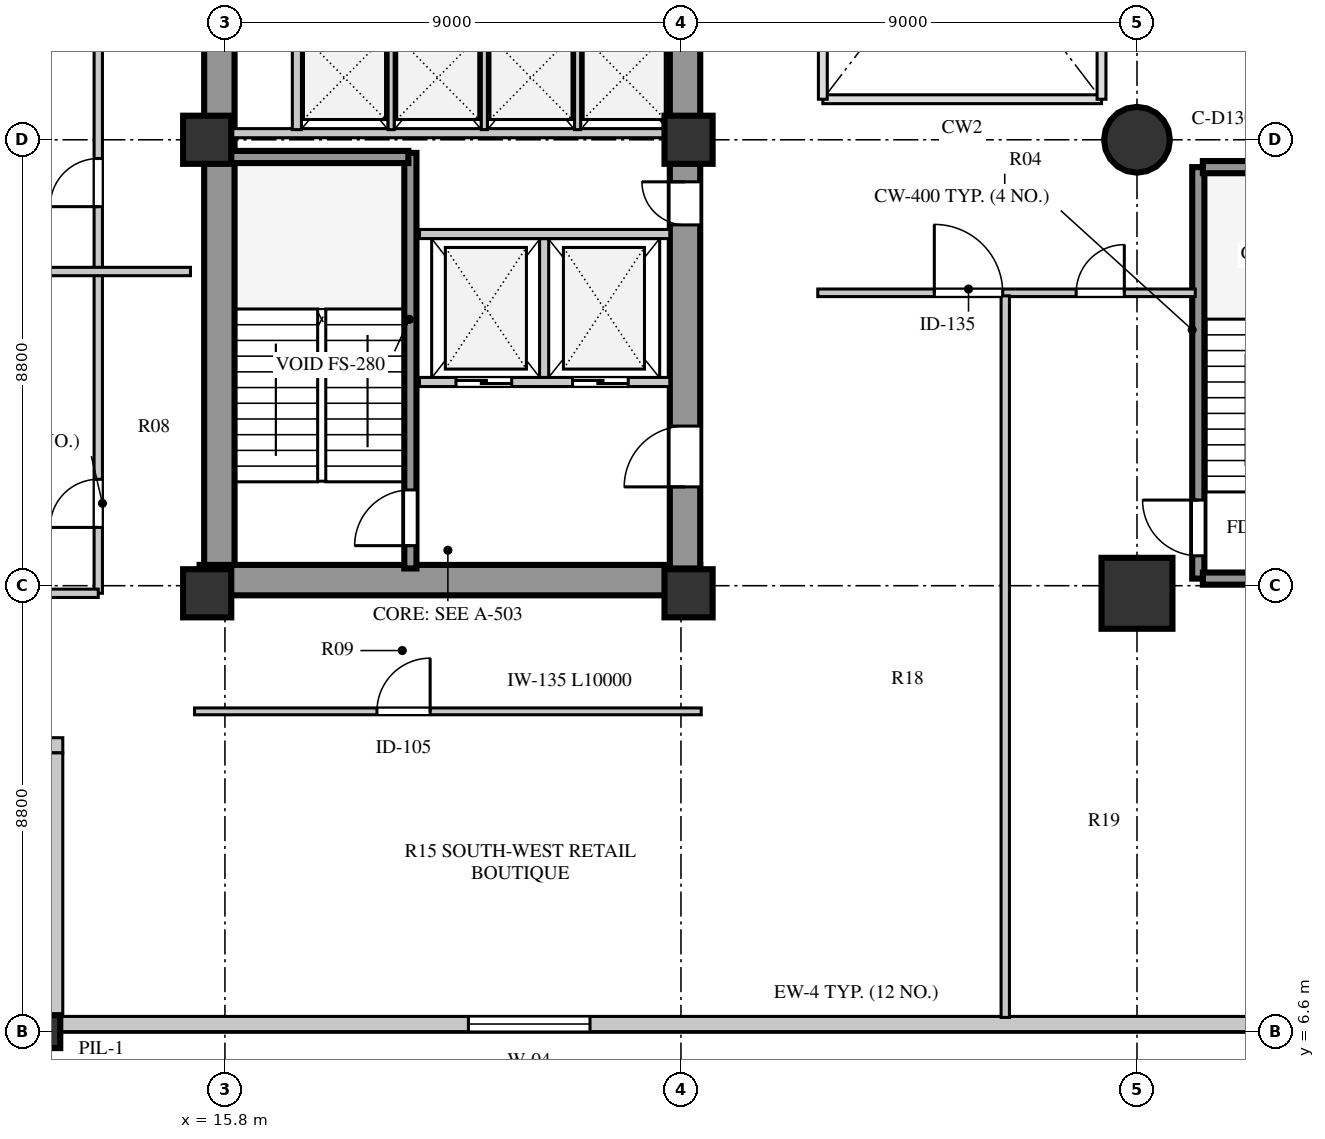
"""IFC4 building model, lengths in metres.
Left out: names, types, materials, properties, quantities, classifications, styles, units other than length and angle.
Written with IfcOpenShell. Run it as: python <this file> out.ifc"""

import sys

from ifc_helpers import new_model, si_unit, direction, frame, frame_2d, origin, origin_2d, place, context, subcontext, project, spatial, rectangle, circle, extrude, element, fill, save


model = new_model("IFC4")
c1 = context("Model", 3, precision=1e-05, world=origin(), true_north=direction((0.0, 1.0)))
c2 = subcontext(c1, "Body", "Model", "MODEL_VIEW")
j1 = project(units=[si_unit("LENGTHUNIT", "METRE"), si_unit("PLANEANGLEUNIT", "RADIAN")], contexts=[c1])
p1 = place(None, origin())
s1 = spatial("IfcSite", under=j1, at=p1, CompositionType="ELEMENT")
p2 = place(p1, origin())
s2 = spatial("IfcBuilding", under=s1, at=p2, CompositionType="ELEMENT")
p3 = place(p2, frame((0.0, 0.0, 17.0)))
s3 = spatial("IfcBuildingStorey", under=s2, at=p3, CompositionType="ELEMENT", Elevation=17.0)
p4 = place(p3, frame((15.3, 15.51, 0.0), z_axis=(0.0, 0.0, 1.0), x_axis=(1.0, 0.0, 0.0)))
e1 = element("IfcWall", 1, at=p4, inside=s3, PredefinedType="SHEAR", context=c2, shape_type="SweptSolid", body=[
    extrude(rectangle(XDim=9.88, YDim=0.6, at=frame_2d((4.94, 0.0))), origin(), (0.0, 0.0, 1.0), 4.22),
])
p5 = place(p3, frame((15.69, 15.81, 0.0), z_axis=(0.0, 0.0, 1.0), x_axis=(0.0, 1.0, 0.0)))
e2 = element("IfcWall", 2, at=p5, inside=s3, PredefinedType="SHEAR", context=c2, shape_type="SweptSolid", body=[
    extrude(rectangle(XDim=25.63, YDim=0.6, at=frame_2d((12.815, 0.0))), origin(), (0.0, 0.0, 1.0), 4.22),
])
p6 = place(p3, frame((24.88, 15.74, 0.0), z_axis=(0.0, 0.0, 1.0), x_axis=(0.0, 1.0, 0.0)))
e3 = element("IfcWall", 3, at=p6, inside=s3, PredefinedType="SHEAR", context=c2, shape_type="SweptSolid", body=[
    extrude(rectangle(XDim=25.76, YDim=0.6, at=frame_2d((12.88, 0.0))), origin(), (0.0, 0.0, 1.0), 4.22),
])
p7 = place(p6, frame((1.61, 0.0, 0.0)))
e4 = element("IfcOpeningElement", 4, at=p7, cuts=e3, PredefinedType="OPENING", context=c2, shape_type="SweptSolid", body=[
    extrude(rectangle(XDim=1.2, YDim=2.1, at=frame_2d((0.6, 1.05))), frame((0.0, 0.31, 0.0), z_axis=(0.0, -1.0, 0.0), x_axis=(1.0, 0.0, 0.0)), (0.0, 0.0, 1.0), 0.62),
])
p8 = place(p6, frame((6.78, 0.0, 0.0)))
e5 = element("IfcOpeningElement", 5, at=p8, cuts=e3, PredefinedType="OPENING", context=c2, shape_type="SweptSolid", body=[
    extrude(rectangle(XDim=0.85, YDim=2.06, at=frame_2d((0.425, 1.03))), frame((0.0, 0.31, 0.0), z_axis=(0.0, -1.0, 0.0), x_axis=(1.0, 0.0, 0.0)), (0.0, 0.0, 1.0), 0.62),
])
p9 = place(p6, frame((12.11, 0.0, 0.0)))
e6 = element("IfcOpeningElement", 6, at=p9, cuts=e3, PredefinedType="OPENING", context=c2, shape_type="SweptSolid", body=[
    extrude(rectangle(XDim=1.5, YDim=2.12, at=frame_2d((0.75, 1.06))), frame((0.0, 0.31, 0.0), z_axis=(0.0, -1.0, 0.0), x_axis=(1.0, 0.0, 0.0)), (0.0, 0.0, 1.0), 0.62),
])
p10 = place(p6, frame((20.11, 0.0, 0.0)))
e7 = element("IfcOpeningElement", 7, at=p10, cuts=e3, PredefinedType="OPENING", context=c2, shape_type="SweptSolid", body=[
    extrude(rectangle(XDim=1.2, YDim=2.12, at=frame_2d((0.6, 1.06))), frame((0.0, 0.31, 0.0), z_axis=(0.0, -1.0, 0.0), x_axis=(1.0, 0.0, 0.0)), (0.0, 0.0, 1.0), 0.62),
])
p11 = place(p6, frame((24.01, 0.0, 0.0)))
e8 = element("IfcOpeningElement", 8, at=p11, cuts=e3, PredefinedType="OPENING", context=c2, shape_type="SweptSolid", body=[
    extrude(rectangle(XDim=0.95, YDim=2.1, at=frame_2d((0.475, 1.05))), frame((0.0, 0.31, 0.0), z_axis=(0.0, -1.0, 0.0), x_axis=(1.0, 0.0, 0.0)), (0.0, 0.0, 1.0), 0.62),
])
for number, where, z_axis, x_axis in (
    (9, (15.45, 15.25, 0.0), (0.0, 0.0, 1.0), (1.0, 0.0, 0.0)),
    (10, (15.45, 24.2, 0.0), (0.0, 0.0, 1.0), (1.0, 0.0, 0.0)),
    (11, (24.95, 15.25, 0.0), (0.0, 0.0, 1.0), (1.0, 0.0, 0.0)),
    (12, (24.95, 24.2, 0.0), (0.0, 0.0, 1.0), (1.0, 0.0, 0.0)),
):
    element("IfcColumn", number, at=place(p3, frame(where, z_axis=z_axis, x_axis=x_axis)), inside=s3, PredefinedType="COLUMN", context=c2, shape_type="SweptSolid", body=[
        extrude(rectangle(XDim=0.95, YDim=0.95, at=origin_2d()), origin(), (0.0, 0.0, 1.0), 4.22),
    ])
p12 = place(p3, frame((33.8, 15.25, 0.0), z_axis=(0.0, 0.0, 1.0), x_axis=(1.0, 0.0, 0.0)))
e13 = element("IfcColumn", 13, at=p12, inside=s3, PredefinedType="COLUMN", context=c2, shape_type="SweptSolid", body=[
    extrude(rectangle(XDim=1.4, YDim=1.4, at=origin_2d()), origin(), (0.0, 0.0, 1.0), 4.22),
])
p13 = place(p3, frame((33.8, 24.2, 0.0), z_axis=(0.0, 0.0, 1.0), x_axis=(1.0, 0.0, 0.0)))
e14 = element("IfcColumn", 14, at=p13, inside=s3, PredefinedType="COLUMN", context=c2, shape_type="SweptSolid", body=[
    extrude(circle(Radius=0.65, at=origin_2d()), origin(), (0.0, 0.0, 1.0), 4.22),
])
p14 = place(p3, frame((12.3, 6.6, 0.0), z_axis=(0.0, 0.0, 1.0), x_axis=(1.0, 0.0, 0.0)))
e15 = element("IfcColumn", 15, at=p14, inside=s3, PredefinedType="PILASTER", context=c2, shape_type="SweptSolid", body=[
    extrude(rectangle(XDim=0.5, YDim=0.65, at=origin_2d()), origin(), (0.0, 0.0, 1.0), 4.22),
])
p15 = place(p3, frame((12.3, 6.75, 0.0), z_axis=(0.0, 0.0, 1.0), x_axis=(1.0, 0.0, 0.0)))
e16 = element("IfcWall", 16, at=p15, inside=s3, PredefinedType="STANDARD", context=c2, shape_type="SweptSolid", body=[
    extrude(rectangle(XDim=34.0, YDim=0.3, at=frame_2d((17.0, 0.0))), origin(), (0.0, 0.0, 1.0), 4.22),
])
p16 = place(p15, frame((8.305, 0.0, 0.8)))
e17 = element("IfcOpeningElement", 17, at=p16, cuts=e16, PredefinedType="OPENING", context=c2, shape_type="SweptSolid", body=[
    extrude(rectangle(XDim=2.4, YDim=2.05, at=frame_2d((1.2, 1.025))), frame((0.0, 0.16, 0.0), z_axis=(0.0, -1.0, 0.0), x_axis=(1.0, 0.0, 0.0)), (0.0, 0.0, 1.0), 0.32),
])
p17 = place(p15, frame((25.345, 0.0, 0.8)))
e18 = element("IfcOpeningElement", 18, at=p17, cuts=e16, PredefinedType="OPENING", context=c2, shape_type="SweptSolid", body=[
    extrude(rectangle(XDim=2.1, YDim=1.95, at=frame_2d((1.05, 0.975))), frame((0.0, 0.16, 0.0), z_axis=(0.0, -1.0, 0.0), x_axis=(1.0, 0.0, 0.0)), (0.0, 0.0, 1.0), 0.32),
])
p18 = place(p3, frame((6.8, 12.25, 0.0), z_axis=(0.0, 0.0, 1.0), x_axis=(1.0, 0.0, 0.0)))
e19 = element("IfcWall", 19, at=p18, inside=s3, PredefinedType="STANDARD", context=c2, shape_type="SweptSolid", body=[
    extrude(rectangle(XDim=5.8, YDim=0.3, at=frame_2d((2.9, 0.0))), origin(), (0.0, 0.0, 1.0), 4.22),
])
p19 = place(p3, frame((12.45, 12.1, 0.0), z_axis=(0.0, 0.0, 1.0), x_axis=(0.0, -1.0, 0.0)))
e20 = element("IfcWall", 20, at=p19, inside=s3, PredefinedType="STANDARD", context=c2, shape_type="SweptSolid", body=[
    extrude(rectangle(XDim=5.2, YDim=0.3, at=frame_2d((2.6, 0.0))), origin(), (0.0, 0.0, 1.0), 4.22),
])
p20 = place(p3, frame((19.46, 15.74, 0.0), z_axis=(0.0, 0.0, 1.0), x_axis=(0.0, 1.0, 0.0)))
e21 = element("IfcWall", 21, at=p20, inside=s3, PredefinedType="SHEAR", context=c2, shape_type="SweptSolid", body=[
    extrude(rectangle(XDim=8.2, YDim=0.24, at=frame_2d((4.1, 0.0))), origin(), (0.0, 0.0, 1.0), 4.5),
])
p21 = place(p20, frame((0.45, 0.0, 0.0)))
e22 = element("IfcOpeningElement", 22, at=p21, cuts=e21, PredefinedType="OPENING", context=c2, shape_type="SweptSolid", body=[
    extrude(rectangle(XDim=1.1, YDim=2.1, at=frame_2d((0.55, 1.05))), frame((0.0, 0.13, 0.0), z_axis=(0.0, -1.0, 0.0), x_axis=(1.0, 0.0, 0.0)), (0.0, 0.0, 1.0), 0.26),
])
p22 = place(p3, frame((15.9, 23.86, 0.0), z_axis=(0.0, 0.0, 1.0), x_axis=(1.0, 0.0, 0.0)))
e23 = element("IfcWall", 23, at=p22, inside=s3, PredefinedType="SHEAR", context=c2, shape_type="SweptSolid", body=[
    extrude(rectangle(XDim=3.52, YDim=0.24, at=frame_2d((1.76, 0.0))), origin(), (0.0, 0.0, 1.0), 4.5),
])
p23 = place(p3, frame((19.64, 19.42, 0.0), z_axis=(0.0, 0.0, 1.0), x_axis=(1.0, 0.0, 0.0)))
e24 = element("IfcWall", 24, at=p23, inside=s3, PredefinedType="SOLIDWALL", context=c2, shape_type="SweptSolid", body=[
    extrude(rectangle(XDim=4.94, YDim=0.18, at=frame_2d((2.47, 0.0))), origin(), (0.0, 0.0, 1.0), 4.22),
])
p24 = place(p23, frame((0.72, 0.0, 0.0)))
e25 = element("IfcOpeningElement", 25, at=p24, cuts=e24, PredefinedType="OPENING", context=c2, shape_type="SweptSolid", body=[
    extrude(rectangle(XDim=1.1, YDim=2.1, at=frame_2d((0.55, 1.05))), frame((0.0, 0.1, 0.0), z_axis=(0.0, -1.0, 0.0), x_axis=(1.0, 0.0, 0.0)), (0.0, 0.0, 1.0), 0.2),
])
p25 = place(p23, frame((3.02, 0.0, 0.0)))
e26 = element("IfcOpeningElement", 26, at=p25, cuts=e24, PredefinedType="OPENING", context=c2, shape_type="SweptSolid", body=[
    extrude(rectangle(XDim=1.1, YDim=2.1, at=frame_2d((0.55, 1.05))), frame((0.0, 0.1, 0.0), z_axis=(0.0, -1.0, 0.0), x_axis=(1.0, 0.0, 0.0)), (0.0, 0.0, 1.0), 0.2),
])
p26 = place(p3, frame((22.1, 19.51, 0.0), z_axis=(0.0, 0.0, 1.0), x_axis=(0.0, 1.0, 0.0)))
e27 = element("IfcWall", 27, at=p26, inside=s3, PredefinedType="SOLIDWALL", context=c2, shape_type="SweptSolid", body=[
    extrude(rectangle(XDim=2.74, YDim=0.18, at=frame_2d((1.37, 0.0))), origin(), (0.0, 0.0, 1.0), 4.22),
])
p27 = place(p3, frame((19.64, 22.34, 0.0), z_axis=(0.0, 0.0, 1.0), x_axis=(1.0, 0.0, 0.0)))
e28 = element("IfcWall", 28, at=p27, inside=s3, PredefinedType="SOLIDWALL", context=c2, shape_type="SweptSolid", body=[
    extrude(rectangle(XDim=4.94, YDim=0.18, at=frame_2d((2.47, 0.0))), origin(), (0.0, 0.0, 1.0), 4.22),
])
p28 = place(p3, frame((15.9, 24.33, 0.0), z_axis=(0.0, 0.0, 1.0), x_axis=(1.0, 0.0, 0.0)))
e29 = element("IfcWall", 29, at=p28, inside=s3, PredefinedType="SOLIDWALL", context=c2, shape_type="SweptSolid", body=[
    extrude(rectangle(XDim=8.68, YDim=0.18, at=frame_2d((4.34, 0.0))), origin(), (0.0, 0.0, 1.0), 3.42),
])
p29 = place(p3, frame((17.22, 24.4, 0.0), z_axis=(0.0, 0.0, 1.0), x_axis=(0.0, 1.0, 0.0)))
e30 = element("IfcWall", 30, at=p29, inside=s3, PredefinedType="SOLIDWALL", context=c2, shape_type="SweptSolid", body=[
    extrude(rectangle(XDim=2.05, YDim=0.18, at=frame_2d((1.025, 0.0))), origin(), (0.0, 0.0, 1.0), 4.22),
])
for number, where, z_axis, x_axis in (
    (31, (19.08, 24.4, 0.0), (0.0, 0.0, 1.0), (0.0, 1.0, 0.0)),
    (32, (20.92, 24.4, 0.0), (0.0, 0.0, 1.0), (0.0, 1.0, 0.0)),
    (33, (22.76, 24.4, 0.0), (0.0, 0.0, 1.0), (0.0, 1.0, 0.0)),
):
    element("IfcWall", number, at=place(p3, frame(where, z_axis=z_axis, x_axis=x_axis)), inside=s3, PredefinedType="PARTITIONING", context=c2, shape_type="SweptSolid", body=[
        extrude(rectangle(XDim=2.05, YDim=0.12, at=frame_2d((1.025, 0.0))), origin(), (0.0, 0.0, 1.0), 4.22),
    ])
p30 = place(p3, frame((35.01, 15.54, 0.0), z_axis=(0.0, 0.0, 1.0), x_axis=(0.0, 1.0, 0.0)))
e34 = element("IfcWall", 34, at=p30, inside=s3, PredefinedType="SHEAR", context=c2, shape_type="SweptSolid", body=[
    extrude(rectangle(XDim=8.12, YDim=0.24, at=frame_2d((4.06, 0.0))), origin(), (0.0, 0.0, 1.0), 4.5),
])
p31 = place(p30, frame((0.45, 0.0, 0.0)))
e35 = element("IfcOpeningElement", 35, at=p31, cuts=e34, PredefinedType="OPENING", context=c2, shape_type="SweptSolid", body=[
    extrude(rectangle(XDim=1.1, YDim=2.1, at=frame_2d((0.55, 1.05))), frame((0.0, 0.13, 0.0), z_axis=(0.0, -1.0, 0.0), x_axis=(1.0, 0.0, 0.0)), (0.0, 0.0, 1.0), 0.26),
])
for number, where, z_axis, x_axis in (
    (36, (35.1, 15.54, 0.0), (0.0, 0.0, 1.0), (1.0, 0.0, 0.0)),
    (37, (35.1, 23.66, 0.0), (0.0, 0.0, 1.0), (1.0, 0.0, 0.0)),
):
    element("IfcWall", number, at=place(p3, frame(where, z_axis=z_axis, x_axis=x_axis)), inside=s3, PredefinedType="SHEAR", context=c2, shape_type="SweptSolid", body=[
        extrude(rectangle(XDim=3.5, YDim=0.24, at=frame_2d((1.75, 0.0))), origin(), (0.0, 0.0, 1.0), 4.5),
    ])
p32 = place(p3, frame((13.3, 15.25, 0.0), z_axis=(0.0, 0.0, 1.0), x_axis=(0.0, 1.0, 0.0)))
e38 = element("IfcWall", 38, at=p32, inside=s3, PredefinedType="PARTITIONING", context=c2, shape_type="SweptSolid", body=[
    extrude(rectangle(XDim=26.7, YDim=0.165, at=frame_2d((13.35, 0.0))), origin(), (0.0, 0.0, 1.0), 4.22),
])
p33 = place(p32, frame((1.3, 0.0, 0.0)))
e39 = element("IfcOpeningElement", 39, at=p33, cuts=e38, PredefinedType="OPENING", context=c2, shape_type="SweptSolid", body=[
    extrude(rectangle(XDim=0.95, YDim=2.08, at=frame_2d((0.475, 1.04))), frame((0.0, 0.093, 0.0), z_axis=(0.0, -1.0, 0.0), x_axis=(1.0, 0.0, 0.0)), (0.0, 0.0, 1.0), 0.185),
])
p34 = place(p32, frame((7.63, 0.0, 0.0)))
e40 = element("IfcOpeningElement", 40, at=p34, cuts=e38, PredefinedType="OPENING", context=c2, shape_type="SweptSolid", body=[
    extrude(rectangle(XDim=0.95, YDim=2.08, at=frame_2d((0.475, 1.04))), frame((0.0, 0.093, 0.0), z_axis=(0.0, -1.0, 0.0), x_axis=(1.0, 0.0, 0.0)), (0.0, 0.0, 1.0), 0.185),
])
p35 = place(p32, frame((14.63, 0.0, 0.0)))
e41 = element("IfcOpeningElement", 41, at=p35, cuts=e38, PredefinedType="OPENING", context=c2, shape_type="SweptSolid", body=[
    extrude(rectangle(XDim=0.95, YDim=2.08, at=frame_2d((0.475, 1.04))), frame((0.0, 0.093, 0.0), z_axis=(0.0, -1.0, 0.0), x_axis=(1.0, 0.0, 0.0)), (0.0, 0.0, 1.0), 0.185),
])
p36 = place(p32, frame((21.63, 0.0, 0.0)))
e42 = element("IfcOpeningElement", 42, at=p36, cuts=e38, PredefinedType="OPENING", context=c2, shape_type="SweptSolid", body=[
    extrude(rectangle(XDim=0.95, YDim=2.08, at=frame_2d((0.475, 1.04))), frame((0.0, 0.093, 0.0), z_axis=(0.0, -1.0, 0.0), x_axis=(1.0, 0.0, 0.0)), (0.0, 0.0, 1.0), 0.185),
])
p37 = place(p3, frame((6.88, 15.25, 0.0), z_axis=(0.0, 0.0, 1.0), x_axis=(1.0, 0.0, 0.0)))
e43 = element("IfcWall", 43, at=p37, inside=s3, PredefinedType="PARTITIONING", context=c2, shape_type="SweptSolid", body=[
    extrude(rectangle(XDim=6.42, YDim=0.165, at=frame_2d((3.21, 0.0))), origin(), (0.0, 0.0, 1.0), 3.72),
])
p38 = place(p3, frame((15.2, 12.92, 0.0), z_axis=(0.0, 0.0, 1.0), x_axis=(1.0, 0.0, 0.0)))
e44 = element("IfcWall", 44, at=p38, inside=s3, PredefinedType="PARTITIONING", context=c2, shape_type="SweptSolid", body=[
    extrude(rectangle(XDim=10.0, YDim=0.135, at=frame_2d((5.0, 0.0))), origin(), (0.0, 0.0, 1.0), 4.22),
])
p39 = place(p38, frame((3.6, 0.0, 0.0)))
e45 = element("IfcOpeningElement", 45, at=p39, cuts=e44, PredefinedType="OPENING", context=c2, shape_type="SweptSolid", body=[
    extrude(rectangle(XDim=1.05, YDim=2.1, at=frame_2d((0.525, 1.05))), frame((0.0, 0.078, 0.0), z_axis=(0.0, -1.0, 0.0), x_axis=(1.0, 0.0, 0.0)), (0.0, 0.0, 1.0), 0.155),
])
p40 = place(p3, frame((27.5, 21.18, 0.0), z_axis=(0.0, 0.0, 1.0), x_axis=(1.0, 0.0, 0.0)))
e46 = element("IfcWall", 46, at=p40, inside=s3, PredefinedType="PARTITIONING", context=c2, shape_type="SweptSolid", body=[
    extrude(rectangle(XDim=7.45, YDim=0.15, at=frame_2d((3.725, 0.0))), origin(), (0.0, 0.0, 1.0), 3.82),
])
p41 = place(p40, frame((5.1, 0.0, 0.0)))
e47 = element("IfcOpeningElement", 47, at=p41, cuts=e46, PredefinedType="OPENING", context=c2, shape_type="SweptSolid", body=[
    extrude(rectangle(XDim=0.95, YDim=2.08, at=frame_2d((0.475, 1.04))), frame((0.0, 0.085, 0.0), z_axis=(0.0, -1.0, 0.0), x_axis=(1.0, 0.0, 0.0)), (0.0, 0.0, 1.0), 0.17),
])
p42 = place(p40, frame((2.3, 0.0, 0.0)))
e48 = element("IfcOpeningElement", 48, at=p42, cuts=e46, PredefinedType="OPENING", context=c2, shape_type="SweptSolid", body=[
    extrude(rectangle(XDim=1.35, YDim=2.1, at=frame_2d((0.675, 1.05))), frame((0.0, 0.085, 0.0), z_axis=(0.0, -1.0, 0.0), x_axis=(1.0, 0.0, 0.0)), (0.0, 0.0, 1.0), 0.17),
])
p43 = place(p3, frame((31.2, 6.88, 0.0), z_axis=(0.0, 0.0, 1.0), x_axis=(0.0, 1.0, 0.0)))
e49 = element("IfcWall", 49, at=p43, inside=s3, PredefinedType="PARTITIONING", context=c2, shape_type="SweptSolid", body=[
    extrude(rectangle(XDim=14.24, YDim=0.165, at=frame_2d((7.12, 0.0))), origin(), (0.0, 0.0, 1.0), 4.22),
])
p44 = place(p3, frame((6.88, 21.6, 0.0), z_axis=(0.0, 0.0, 1.0), x_axis=(1.0, 0.0, 0.0)))
e50 = element("IfcWall", 50, at=p44, inside=s3, PredefinedType="PARTITIONING", context=c2, shape_type="SweptSolid", body=[
    extrude(rectangle(XDim=8.24, YDim=0.165, at=frame_2d((4.12, 0.0))), origin(), (0.0, 0.0, 1.0), 4.22),
])
p45 = place(p16, origin())
e51 = element("IfcWindow", 51, at=p45, inside=s3, PartitioningType="SINGLE_PANEL", PredefinedType="WINDOW", context=c2, shape_type="SweptSolid", body=[
    extrude(rectangle(XDim=2.4, YDim=2.05, at=frame_2d((1.2, 1.025))), frame((0.0, 0.03, 0.0), z_axis=(0.0, -1.0, 0.0), x_axis=(1.0, 0.0, 0.0)), (0.0, 0.0, 1.0), 0.06),
])
fill(e17, e51)
p46 = place(p21, origin())
e52 = element("IfcDoor", 52, at=p46, inside=s3, OperationType="SINGLE_SWING_LEFT", PredefinedType="DOOR", context=c2, shape_type="SweptSolid", body=[
    extrude(rectangle(XDim=1.1, YDim=2.1, at=frame_2d((0.55, 1.05))), frame((0.0, 0.025, 0.0), z_axis=(0.0, -1.0, 0.0), x_axis=(1.0, 0.0, 0.0)), (0.0, 0.0, 1.0), 0.05),
])
fill(e22, e52)
p47 = place(p24, origin())
e53 = element("IfcDoor", 53, at=p47, inside=s3, OperationType="DOUBLE_DOOR_SLIDING", PredefinedType="DOOR", context=c2, shape_type="SweptSolid", body=[
    extrude(rectangle(XDim=1.1, YDim=2.1, at=frame_2d((0.55, 1.05))), frame((0.0, 0.025, 0.0), z_axis=(0.0, -1.0, 0.0), x_axis=(1.0, 0.0, 0.0)), (0.0, 0.0, 1.0), 0.05),
])
fill(e25, e53)
p48 = place(p25, origin())
e54 = element("IfcDoor", 54, at=p48, inside=s3, OperationType="DOUBLE_DOOR_SLIDING", PredefinedType="DOOR", context=c2, shape_type="SweptSolid", body=[
    extrude(rectangle(XDim=1.1, YDim=2.1, at=frame_2d((0.55, 1.05))), frame((0.0, 0.025, 0.0), z_axis=(0.0, -1.0, 0.0), x_axis=(1.0, 0.0, 0.0)), (0.0, 0.0, 1.0), 0.05),
])
fill(e26, e54)
p49 = place(p7, frame((1.2, 0.0, 0.0), z_axis=(0.0, 0.0, 1.0), x_axis=(-1.0, 0.0, 0.0)))
e55 = element("IfcDoor", 55, at=p49, inside=s3, OperationType="SINGLE_SWING_RIGHT", PredefinedType="DOOR", context=c2, shape_type="SweptSolid", body=[
    extrude(rectangle(XDim=1.2, YDim=2.1, at=frame_2d((0.6, 1.05))), frame((0.0, 0.025, 0.0), z_axis=(0.0, -1.0, 0.0), x_axis=(1.0, 0.0, 0.0)), (0.0, 0.0, 1.0), 0.05),
])
fill(e4, e55)
p50 = place(p8, frame((0.85, 0.0, 0.0), z_axis=(0.0, 0.0, 1.0), x_axis=(-1.0, 0.0, 0.0)))
e56 = element("IfcDoor", 56, at=p50, inside=s3, OperationType="SINGLE_SWING_LEFT", PredefinedType="DOOR", context=c2, shape_type="SweptSolid", body=[
    extrude(rectangle(XDim=0.85, YDim=2.06, at=frame_2d((0.425, 1.03))), frame((0.0, 0.025, 0.0), z_axis=(0.0, -1.0, 0.0), x_axis=(1.0, 0.0, 0.0)), (0.0, 0.0, 1.0), 0.05),
])
fill(e5, e56)
p51 = place(p31, origin())
e57 = element("IfcDoor", 57, at=p51, inside=s3, OperationType="SINGLE_SWING_RIGHT", PredefinedType="DOOR", context=c2, shape_type="SweptSolid", body=[
    extrude(rectangle(XDim=1.1, YDim=2.1, at=frame_2d((0.55, 1.05))), frame((0.0, 0.025, 0.0), z_axis=(0.0, -1.0, 0.0), x_axis=(1.0, 0.0, 0.0)), (0.0, 0.0, 1.0), 0.05),
])
fill(e35, e57)
p52 = place(p33, origin())
e58 = element("IfcDoor", 58, at=p52, inside=s3, OperationType="SINGLE_SWING_LEFT", PredefinedType="DOOR", context=c2, shape_type="SweptSolid", body=[
    extrude(rectangle(XDim=0.95, YDim=2.08, at=frame_2d((0.475, 1.04))), frame((0.0, 0.025, 0.0), z_axis=(0.0, -1.0, 0.0), x_axis=(1.0, 0.0, 0.0)), (0.0, 0.0, 1.0), 0.05),
])
fill(e39, e58)
p53 = place(p34, origin())
e59 = element("IfcDoor", 59, at=p53, inside=s3, OperationType="SINGLE_SWING_LEFT", PredefinedType="DOOR", context=c2, shape_type="SweptSolid", body=[
    extrude(rectangle(XDim=0.95, YDim=2.08, at=frame_2d((0.475, 1.04))), frame((0.0, 0.025, 0.0), z_axis=(0.0, -1.0, 0.0), x_axis=(1.0, 0.0, 0.0)), (0.0, 0.0, 1.0), 0.05),
])
fill(e40, e59)
p54 = place(p39, frame((1.05, 0.0, 0.0), z_axis=(0.0, 0.0, 1.0), x_axis=(-1.0, 0.0, 0.0)))
e60 = element("IfcDoor", 60, at=p54, inside=s3, OperationType="SINGLE_SWING_LEFT", PredefinedType="DOOR", context=c2, shape_type="SweptSolid", body=[
    extrude(rectangle(XDim=1.05, YDim=2.1, at=frame_2d((0.525, 1.05))), frame((0.0, 0.025, 0.0), z_axis=(0.0, -1.0, 0.0), x_axis=(1.0, 0.0, 0.0)), (0.0, 0.0, 1.0), 0.05),
])
fill(e45, e60)
p55 = place(p41, frame((0.95, 0.0, 0.0), z_axis=(0.0, 0.0, 1.0), x_axis=(-1.0, 0.0, 0.0)))
e61 = element("IfcDoor", 61, at=p55, inside=s3, OperationType="SINGLE_SWING_LEFT", PredefinedType="DOOR", context=c2, shape_type="SweptSolid", body=[
    extrude(rectangle(XDim=0.95, YDim=2.08, at=frame_2d((0.475, 1.04))), frame((0.0, 0.025, 0.0), z_axis=(0.0, -1.0, 0.0), x_axis=(1.0, 0.0, 0.0)), (0.0, 0.0, 1.0), 0.05),
])
fill(e47, e61)
p56 = place(p42, frame((1.35, 0.0, 0.0), z_axis=(0.0, 0.0, 1.0), x_axis=(-1.0, 0.0, 0.0)))
e62 = element("IfcDoor", 62, at=p56, inside=s3, OperationType="SINGLE_SWING_RIGHT", PredefinedType="DOOR", context=c2, shape_type="SweptSolid", body=[
    extrude(rectangle(XDim=1.35, YDim=2.1, at=frame_2d((0.675, 1.05))), frame((0.0, 0.025, 0.0), z_axis=(0.0, -1.0, 0.0), x_axis=(1.0, 0.0, 0.0)), (0.0, 0.0, 1.0), 0.05),
])
fill(e48, e62)
save(model, sys.argv[1])
